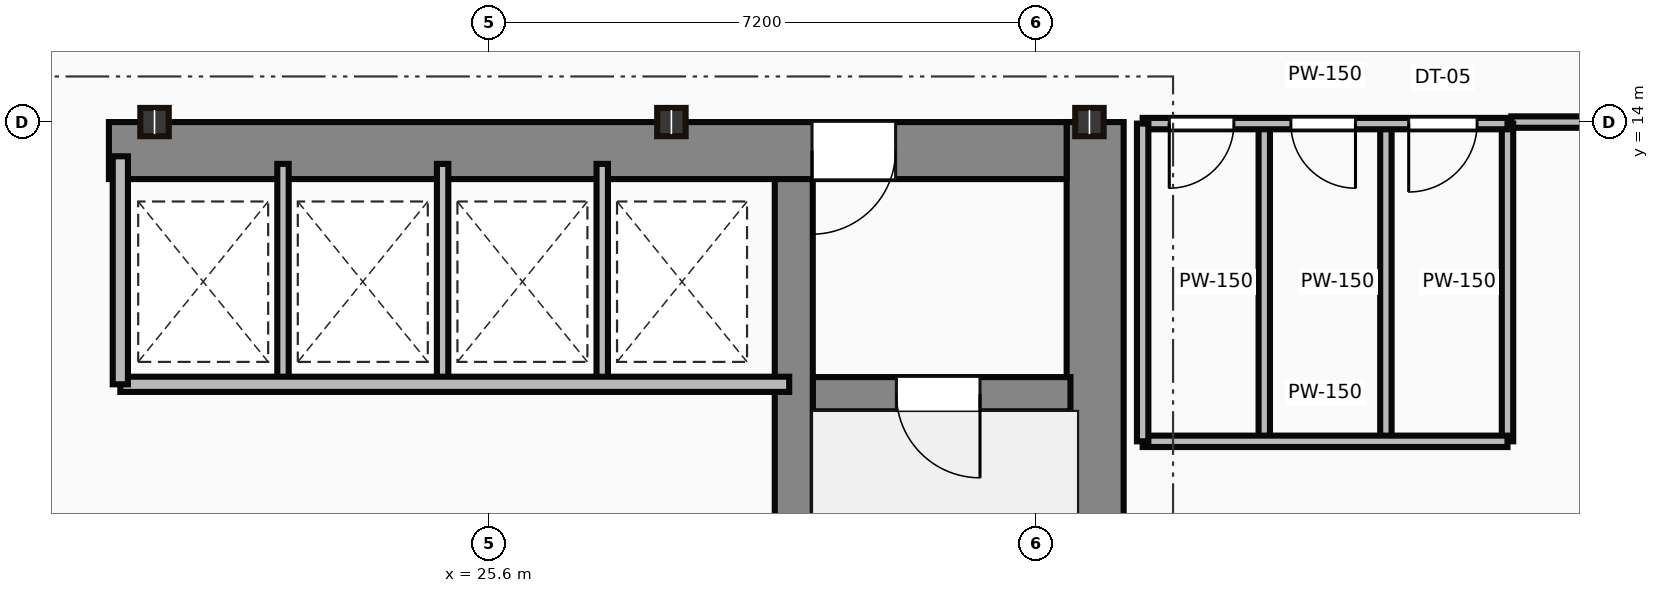
"""IFC4 building model, lengths in metres.
Left out: names, types, materials, properties, quantities, classifications, styles, units other than length and angle.
Written with IfcOpenShell. Run it as: python <this file> out.ifc"""

import sys

from ifc_helpers import new_model, si_unit, direction, frame, frame_2d, origin, origin_2d, place, context, subcontext, project, spatial, rectangle, i_section, extrude, source, transform, mapped, element, fill, save


model = new_model("IFC4")
c1 = context("Model", 3, precision=1e-05, world=origin(), true_north=direction((0.0, 1.0)))
c2 = subcontext(c1, "Body", "Model", "MODEL_VIEW")
j1 = project(units=[si_unit("LENGTHUNIT", "METRE"), si_unit("PLANEANGLEUNIT", "RADIAN")], contexts=[c1])
p1 = place(None, origin())
s1 = spatial("IfcSite", under=j1, at=p1, CompositionType="ELEMENT")
p2 = place(p1, origin())
s2 = spatial("IfcBuilding", under=s1, at=p2, CompositionType="ELEMENT")
p3 = place(p2, frame((0.0, 0.0, 177.1)))
s3 = spatial("IfcBuildingStorey", under=s2, at=p3, CompositionType="ELEMENT", Elevation=177.1)
m1 = source(origin(), c2, "Body", "SweptSolid", [
    extrude(rectangle(XDim=13.1, YDim=0.75, at=frame_2d((6.55, 0.0))), origin(), (0.0, 0.0, 1.0), 3.65),
])
p4 = place(p3, frame((33.575, 0.9, 0.0), z_axis=(0.0, 0.0, 1.0), x_axis=(0.0, 1.0, 0.0)))
e1 = element("IfcWall", 1, at=p4, inside=s3, PredefinedType="SHEAR", context=c2, shape_type="MappedRepresentation", body=[
    mapped(m1, transform((0.0, 0.0, 0.0))),
])
m2 = source(origin(), c2, "Body", "SweptSolid", [
    extrude(rectangle(XDim=12.6, YDim=0.75, at=frame_2d((6.3, 0.0))), origin(), (0.0, 0.0, 1.0), 3.65),
])
p5 = place(p3, frame((20.6, 13.625, 0.0), z_axis=(0.0, 0.0, 1.0), x_axis=(1.0, 0.0, 0.0)))
e2 = element("IfcWall", 2, at=p5, inside=s3, PredefinedType="SHEAR", context=c2, shape_type="MappedRepresentation", body=[
    mapped(m2, transform((0.0, 0.0, 0.0))),
])
p6 = place(p5, frame((9.25, 0.0, 0.0)))
e3 = element("IfcOpeningElement", 3, at=p6, cuts=e2, PredefinedType="OPENING", context=c2, shape_type="SweptSolid", body=[
    extrude(rectangle(XDim=1.1, YDim=2.15, at=frame_2d((0.55, 1.075))), frame((0.0, 0.385, 0.0), z_axis=(0.0, -1.0, 0.0), x_axis=(1.0, 0.0, 0.0)), (0.0, 0.0, 1.0), 0.77),
])
m3 = source(origin(), c2, "Body", "SweptSolid", [
    extrude(rectangle(XDim=12.35, YDim=0.5, at=frame_2d((6.175, 0.0))), origin(), (0.0, 0.0, 1.0), 3.65),
])
p7 = place(p3, frame((29.61, 0.9, 0.0), z_axis=(0.0, 0.0, 1.0), x_axis=(0.0, 1.0, 0.0)))
e4 = element("IfcWall", 4, at=p7, inside=s3, PredefinedType="SHEAR", context=c2, shape_type="MappedRepresentation", body=[
    mapped(m3, transform((0.0, 0.0, 0.0))),
])
m4 = source(origin(), c2, "Body", "SweptSolid", [
    extrude(rectangle(XDim=3.39, YDim=0.45, at=frame_2d((1.695, 0.0))), origin(), (0.0, 0.0, 1.0), 3.65),
])
p8 = place(p3, frame((29.86, 10.42, 0.0), z_axis=(0.0, 0.0, 1.0), x_axis=(1.0, 0.0, 0.0)))
e5 = element("IfcWall", 5, at=p8, inside=s3, PredefinedType="SHEAR", context=c2, shape_type="MappedRepresentation", body=[
    mapped(m4, transform((0.0, 0.0, 0.0))),
])
p9 = place(p8, frame((1.1, 0.0, 0.0)))
e6 = element("IfcOpeningElement", 6, at=p9, cuts=e5, PredefinedType="OPENING", context=c2, shape_type="SweptSolid", body=[
    extrude(rectangle(XDim=1.1, YDim=2.15, at=frame_2d((0.55, 1.075))), frame((0.0, 0.235, 0.0), z_axis=(0.0, -1.0, 0.0), x_axis=(1.0, 0.0, 0.0)), (0.0, 0.0, 1.0), 0.47),
])
m5 = source(origin(), c2, "Body", "SweptSolid", [
    extrude(i_section(OverallWidth=0.374, OverallDepth=0.372, WebThickness=0.016, FlangeThickness=0.026, at=origin_2d()), origin(), (0.0, 0.0, 1.0), 3.65),
])
for number, where, z_axis, x_axis in (
    (7, (21.2, 14.0, 0.0), (0.0, 0.0, 1.0), (1.0, 0.0, 0.0)),
    (8, (28.0, 14.0, 0.0), (0.0, 0.0, 1.0), (1.0, 0.0, 0.0)),
    (9, (33.5, 14.0, 0.0), (0.0, 0.0, 1.0), (1.0, 0.0, 0.0)),
):
    element("IfcColumn", number, at=place(p3, frame(where, z_axis=z_axis, x_axis=x_axis)), inside=s3, PredefinedType="COLUMN", context=c2, shape_type="MappedRepresentation", body=[
        mapped(m5, transform((0.0, 0.0, 0.0))),
    ])
m6 = source(origin(), c2, "Body", "SweptSolid", [
    extrude(rectangle(XDim=8.8, YDim=0.2, at=frame_2d((4.4, 0.0))), origin(), (0.0, 0.0, 1.0), 3.4),
])
p10 = place(p3, frame((20.75, 10.55, 0.0), z_axis=(0.0, 0.0, 1.0), x_axis=(1.0, 0.0, 0.0)))
e10 = element("IfcWall", 10, at=p10, inside=s3, PredefinedType="PARTITIONING", context=c2, shape_type="MappedRepresentation", body=[
    mapped(m6, transform((0.0, 0.0, 0.0))),
])
m7 = source(origin(), c2, "Body", "SweptSolid", [
    extrude(rectangle(XDim=3.0, YDim=0.2, at=frame_2d((1.5, 0.0))), origin(), (0.0, 0.0, 1.0), 3.4),
])
p11 = place(p3, frame((20.75, 10.55, 0.0), z_axis=(0.0, 0.0, 1.0), x_axis=(0.0, 1.0, 0.0)))
e11 = element("IfcWall", 11, at=p11, inside=s3, PredefinedType="PARTITIONING", context=c2, shape_type="MappedRepresentation", body=[
    mapped(m7, transform((0.0, 0.0, 0.0))),
])
m8 = source(origin(), c2, "Body", "SweptSolid", [
    extrude(rectangle(XDim=2.85, YDim=0.15, at=frame_2d((1.425, 0.0))), origin(), (0.0, 0.0, 1.0), 3.4),
])
for number, where, z_axis, x_axis in (
    (12, (22.89, 10.6, 0.0), (0.0, 0.0, 1.0), (0.0, 1.0, 0.0)),
    (13, (24.99, 10.6, 0.0), (0.0, 0.0, 1.0), (0.0, 1.0, 0.0)),
    (14, (27.09, 10.6, 0.0), (0.0, 0.0, 1.0), (0.0, 1.0, 0.0)),
):
    element("IfcWall", number, at=place(p3, frame(where, z_axis=z_axis, x_axis=x_axis)), inside=s3, PredefinedType="PARTITIONING", context=c2, shape_type="MappedRepresentation", body=[
        mapped(m8, transform((0.0, 0.0, 0.0))),
    ])
m9 = source(origin(), c2, "Body", "SweptSolid", [
    extrude(rectangle(XDim=4.8, YDim=0.15, at=frame_2d((2.4, 0.0))), origin(), (0.0, 0.0, 1.0), 2.76),
])
p12 = place(p3, frame((34.2, 13.98, 0.0), z_axis=(0.0, 0.0, 1.0), x_axis=(1.0, 0.0, 0.0)))
e15 = element("IfcWall", 15, at=p12, inside=s3, PredefinedType="PARTITIONING", context=c2, shape_type="MappedRepresentation", body=[
    mapped(m9, transform((0.0, 0.0, 0.0))),
])
p13 = place(p12, frame((0.35, 0.0, 0.0)))
e16 = element("IfcOpeningElement", 16, at=p13, cuts=e15, PredefinedType="OPENING", context=c2, shape_type="SweptSolid", body=[
    extrude(rectangle(XDim=0.85, YDim=2.1, at=frame_2d((0.425, 1.05))), frame((0.0, 0.085, 0.0), z_axis=(0.0, -1.0, 0.0), x_axis=(1.0, 0.0, 0.0)), (0.0, 0.0, 1.0), 0.17),
])
p14 = place(p12, frame((1.95, 0.0, 0.0)))
e17 = element("IfcOpeningElement", 17, at=p14, cuts=e15, PredefinedType="OPENING", context=c2, shape_type="SweptSolid", body=[
    extrude(rectangle(XDim=0.85, YDim=2.1, at=frame_2d((0.425, 1.05))), frame((0.0, 0.085, 0.0), z_axis=(0.0, -1.0, 0.0), x_axis=(1.0, 0.0, 0.0)), (0.0, 0.0, 1.0), 0.17),
])
p15 = place(p12, frame((3.5, 0.0, 0.0)))
e18 = element("IfcOpeningElement", 18, at=p15, cuts=e15, PredefinedType="OPENING", context=c2, shape_type="SweptSolid", body=[
    extrude(rectangle(XDim=0.9, YDim=2.1, at=frame_2d((0.45, 1.05))), frame((0.0, 0.085, 0.0), z_axis=(0.0, -1.0, 0.0), x_axis=(1.0, 0.0, 0.0)), (0.0, 0.0, 1.0), 0.17),
])
m10 = source(origin(), c2, "Body", "SweptSolid", [
    extrude(rectangle(XDim=4.8, YDim=0.15, at=frame_2d((2.4, 0.0))), origin(), (0.0, 0.0, 1.0), 3.4),
])
p16 = place(p3, frame((34.2, 9.8, 0.0), z_axis=(0.0, 0.0, 1.0), x_axis=(1.0, 0.0, 0.0)))
e19 = element("IfcWall", 19, at=p16, inside=s3, PredefinedType="PARTITIONING", context=c2, shape_type="MappedRepresentation", body=[
    mapped(m10, transform((0.0, 0.0, 0.0))),
])
m11 = source(origin(), c2, "Body", "SweptSolid", [
    extrude(rectangle(XDim=4.18, YDim=0.15, at=frame_2d((2.09, 0.0))), origin(), (0.0, 0.0, 1.0), 3.4),
])
for number, where, z_axis, x_axis in (
    (20, (39.0, 9.8, 0.0), (0.0, 0.0, 1.0), (0.0, 1.0, 0.0)),
    (21, (34.2, 9.8, 0.0), (0.0, 0.0, 1.0), (0.0, 1.0, 0.0)),
    (22, (35.8, 9.8, 0.0), (0.0, 0.0, 1.0), (0.0, 1.0, 0.0)),
    (23, (37.4, 9.8, 0.0), (0.0, 0.0, 1.0), (0.0, 1.0, 0.0)),
):
    element("IfcWall", number, at=place(p3, frame(where, z_axis=z_axis, x_axis=x_axis)), inside=s3, PredefinedType="PARTITIONING", context=c2, shape_type="MappedRepresentation", body=[
        mapped(m11, transform((0.0, 0.0, 0.0))),
    ])
m12 = source(origin(), c2, "Body", "SweptSolid", [
    extrude(rectangle(XDim=1.75, YDim=0.15, at=frame_2d((0.875, 0.0))), origin(), (0.0, 0.0, 1.0), 2.76),
])
p17 = place(p3, frame((40.8, 14.0, 0.0), z_axis=(0.0, 0.0, 1.0), x_axis=(-1.0, 0.0, 0.0)))
e24 = element("IfcWall", 24, at=p17, inside=s3, PredefinedType="PARTITIONING", context=c2, shape_type="MappedRepresentation", body=[
    mapped(m12, transform((0.0, 0.0, 0.0))),
])
m13 = source(origin(), c2, "Body", "SweptSolid", [
    extrude(rectangle(XDim=1.1, YDim=2.15, at=frame_2d((0.55, 1.075))), frame((0.0, 0.025, 0.0), z_axis=(0.0, -1.0, 0.0), x_axis=(1.0, 0.0, 0.0)), (0.0, 0.0, 1.0), 0.05),
])
p18 = place(p9, frame((1.1, 0.0, 0.0), z_axis=(0.0, 0.0, 1.0), x_axis=(-1.0, 0.0, 0.0)))
e25 = element("IfcDoor", 25, at=p18, inside=s3, OperationType="SINGLE_SWING_RIGHT", PredefinedType="DOOR", context=c2, shape_type="MappedRepresentation", body=[
    mapped(m13, transform((0.0, 0.0, 0.0))),
])
fill(e6, e25)
p19 = place(p6, origin())
e26 = element("IfcDoor", 26, at=p19, inside=s3, OperationType="SINGLE_SWING_LEFT", PredefinedType="DOOR", context=c2, shape_type="MappedRepresentation", body=[
    mapped(m13, transform((0.0, 0.0, 0.0))),
])
fill(e3, e26)
m14 = source(origin(), c2, "Body", "SweptSolid", [
    extrude(rectangle(XDim=0.85, YDim=2.1, at=frame_2d((0.425, 1.05))), frame((0.0, 0.025, 0.0), z_axis=(0.0, -1.0, 0.0), x_axis=(1.0, 0.0, 0.0)), (0.0, 0.0, 1.0), 0.05),
])
p20 = place(p13, frame((0.85, 0.0, 0.0), z_axis=(0.0, 0.0, 1.0), x_axis=(-1.0, 0.0, 0.0)))
e27 = element("IfcDoor", 27, at=p20, inside=s3, OperationType="SINGLE_SWING_LEFT", PredefinedType="DOOR", context=c2, shape_type="MappedRepresentation", body=[
    mapped(m14, transform((0.0, 0.0, 0.0))),
])
fill(e16, e27)
p21 = place(p14, frame((0.85, 0.0, 0.0), z_axis=(0.0, 0.0, 1.0), x_axis=(-1.0, 0.0, 0.0)))
e28 = element("IfcDoor", 28, at=p21, inside=s3, OperationType="SINGLE_SWING_RIGHT", PredefinedType="DOOR", context=c2, shape_type="MappedRepresentation", body=[
    mapped(m14, transform((0.0, 0.0, 0.0))),
])
fill(e17, e28)
m15 = source(origin(), c2, "Body", "SweptSolid", [
    extrude(rectangle(XDim=0.9, YDim=2.1, at=frame_2d((0.45, 1.05))), frame((0.0, 0.025, 0.0), z_axis=(0.0, -1.0, 0.0), x_axis=(1.0, 0.0, 0.0)), (0.0, 0.0, 1.0), 0.05),
])
p22 = place(p15, frame((0.9, 0.0, 0.0), z_axis=(0.0, 0.0, 1.0), x_axis=(-1.0, 0.0, 0.0)))
e29 = element("IfcDoor", 29, at=p22, inside=s3, OperationType="SINGLE_SWING_LEFT", PredefinedType="DOOR", context=c2, shape_type="MappedRepresentation", body=[
    mapped(m15, transform((0.0, 0.0, 0.0))),
])
fill(e18, e29)
save(model, sys.argv[1])
